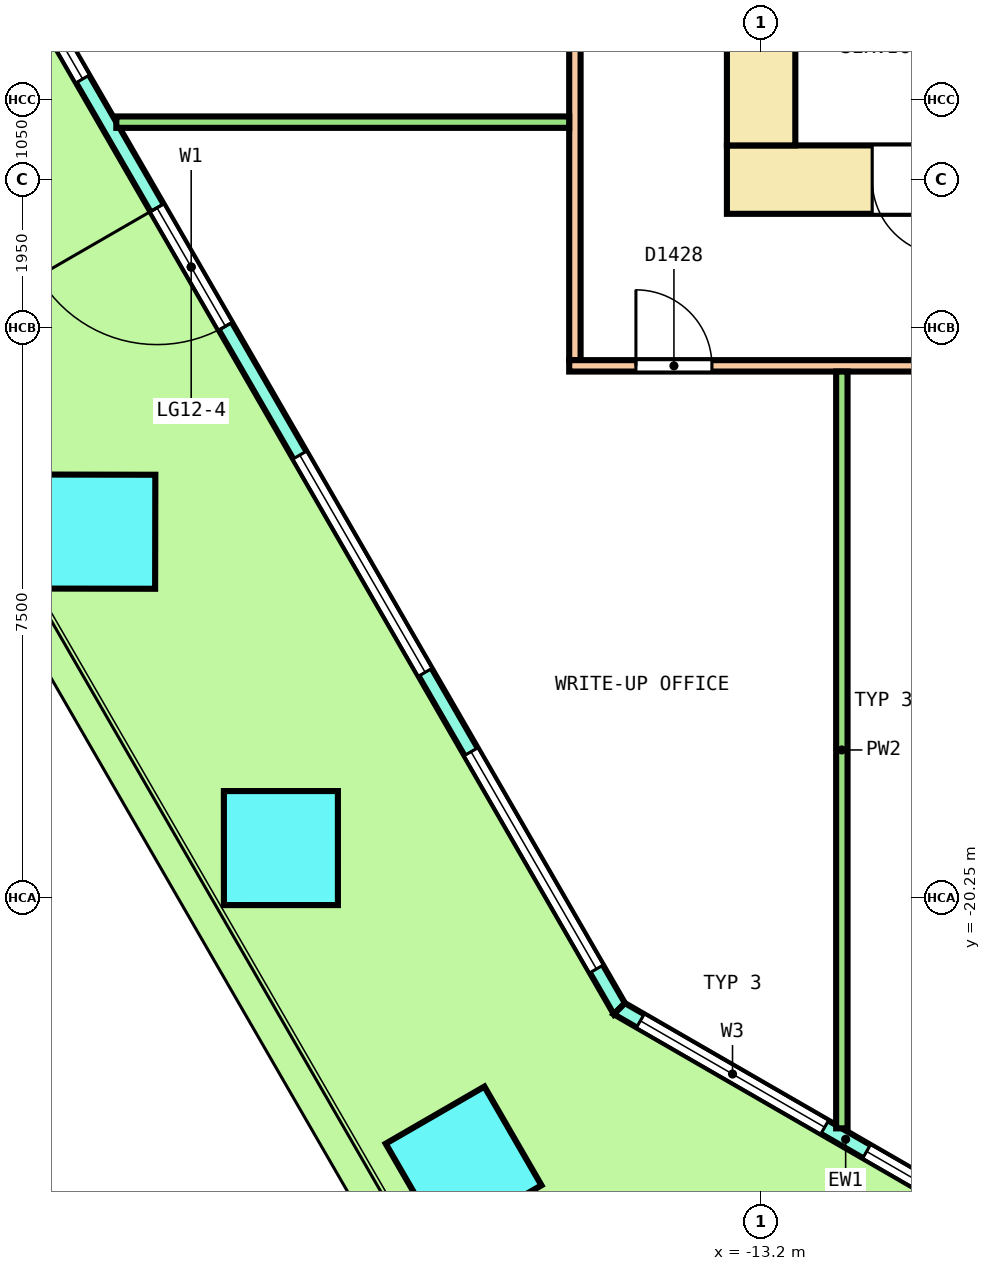
"""IFC4 building model, lengths in metres.
Left out: names, types, materials, properties, quantities, classifications, styles, units other than length and angle.
Written with IfcOpenShell. Run it as: python <this file> out.ifc"""

import sys

from ifc_helpers import new_model, si_unit, direction, frame, frame_2d, origin, origin_2d, place, context, subcontext, project, spatial, polyline, rectangle, outline, extrude, element, fill, save


model = new_model("IFC4")
c1 = context("Model", 3, precision=1e-05, world=origin(), true_north=direction((0.0, 1.0)))
c2 = subcontext(c1, "Body", "Model", "MODEL_VIEW")
j1 = project(units=[si_unit("LENGTHUNIT", "METRE"), si_unit("PLANEANGLEUNIT", "RADIAN")], contexts=[c1])
p1 = place(None, origin())
s1 = spatial("IfcSite", under=j1, at=p1, CompositionType="ELEMENT")
p2 = place(p1, origin())
s2 = spatial("IfcBuilding", under=s1, at=p2, CompositionType="ELEMENT")
p3 = place(p2, frame((0.0, 0.0, 54.2)))
s3 = spatial("IfcBuildingStorey", under=s2, at=p3, CompositionType="ELEMENT", Elevation=54.2)
p4 = place(p3, frame((-21.921, -15.431, 0.0), z_axis=(0.003616759812, -0.006269050341, 0.999973808685), x_axis=(0.498177152713, -0.867045063843, -0.007237525818)))
e1 = element("IfcColumn", 1, at=p4, inside=s3, PredefinedType="COLUMN", context=c2, shape_type="SweptSolid", body=[
    extrude(rectangle(XDim=1.5, YDim=1.5, at=origin_2d()), origin(), (0.0, 0.0, 1.0), 4.05),
])
p5 = place(p3, frame((-19.518, -19.594, 0.0), z_axis=(0.010908253887, -0.018863444567, 0.99976256204), x_axis=(0.500638377412, -0.865382225109, -0.021790354016)))
e2 = element("IfcColumn", 2, at=p5, inside=s3, PredefinedType="COLUMN", context=c2, shape_type="SweptSolid", body=[
    extrude(rectangle(XDim=1.5, YDim=1.5, at=origin_2d()), origin(), (0.0, 0.0, 1.0), 4.051),
])
p6 = place(p3, frame((-17.115, -23.757, 0.0), z_axis=(0.018132595726, -0.031445896907, 0.999340965106), x_axis=(0.865740985748, -0.499504693256, -0.031426215359)))
e3 = element("IfcColumn", 3, at=p6, inside=s3, PredefinedType="COLUMN", context=c2, shape_type="SweptSolid", body=[
    extrude(rectangle(XDim=1.5, YDim=1.5, at=origin_2d()), origin(), (0.0, 0.0, 1.0), 4.053),
])
p7 = place(p3, frame((-26.331, -2.193, 0.0), z_axis=(0.0, 0.0, 1.0), x_axis=(0.499998501835, -0.866026268748, 0.0)))
e4 = element("IfcWall", 4, at=p7, inside=s3, PredefinedType="SOLIDWALL", context=c2, shape_type="SweptSolid", body=[
    extrude(outline(polyline([(-0.027, -0.1), (1.0, -0.1), (2.027, -0.1), (3.053, -0.1), (4.08, -0.1), (5.106, -0.1), (6.133, -0.1), (7.16, -0.1), (8.187, -0.1), (9.213, -0.1), (10.24, -0.1), (11.267, -0.1), (12.293, -0.1), (13.32, -0.1), (14.347, -0.1), (15.373, -0.1), (16.4, -0.1), (17.427, -0.1), (18.453, -0.1), (19.48, -0.1), (20.507, -0.1), (21.533, -0.1), (22.56, -0.1), (22.506, 0.1), (21.485, 0.1), (20.463, 0.1), (19.441, 0.1), (18.419, 0.1), (17.397, 0.1), (16.375, 0.1), (15.354, 0.1), (14.332, 0.1), (13.31, 0.1), (12.288, 0.1), (11.267, 0.1), (10.245, 0.1), (9.223, 0.1), (8.201, 0.1), (7.179, 0.1), (6.158, 0.1), (5.136, 0.1), (4.114, 0.1), (3.092, 0.1), (2.071, 0.1), (1.049, 0.1), (0.027, 0.1), (-0.027, -0.1)])), origin(), (0.0, 0.0, 1.0), 4.1),
])
p8 = place(p7, frame((0.603, 0.0, 0.1)))
e5 = element("IfcOpeningElement", 5, at=p8, cuts=e4, PredefinedType="OPENING", context=c2, shape_type="SweptSolid", body=[
    extrude(rectangle(XDim=3.3, YDim=2.9, at=frame_2d((1.65, 1.45))), frame((0.0, 0.11, 0.0), z_axis=(0.0, -1.0, 0.0), x_axis=(1.0, 0.0, 0.0)), (0.0, 0.0, 1.0), 0.22),
])
p9 = place(p7, frame((5.11, 0.0, 0.1)))
e6 = element("IfcOpeningElement", 6, at=p9, cuts=e4, PredefinedType="OPENING", context=c2, shape_type="SweptSolid", body=[
    extrude(rectangle(XDim=3.3, YDim=2.9, at=frame_2d((1.65, 1.45))), frame((0.0, 0.11, 0.0), z_axis=(0.0, -1.0, 0.0), x_axis=(1.0, 0.0, 0.0)), (0.0, 0.0, 1.0), 0.22),
])
p10 = place(p7, frame((10.367, 0.0, 0.0)))
e7 = element("IfcOpeningElement", 7, at=p10, cuts=e4, PredefinedType="OPENING", context=c2, shape_type="SweptSolid", body=[
    extrude(rectangle(XDim=1.8, YDim=2.4, at=frame_2d((0.9, 1.2))), frame((0.0, 0.11, 0.0), z_axis=(0.0, -1.0, 0.0), x_axis=(1.0, 0.0, 0.0)), (0.0, 0.0, 1.0), 0.22),
])
p11 = place(p7, frame((10.367, 0.0, 2.55)))
e8 = element("IfcOpeningElement", 8, at=p11, cuts=e4, PredefinedType="OPENING", context=c2, shape_type="SweptSolid", body=[
    extrude(rectangle(XDim=1.8, YDim=0.45, at=frame_2d((0.9, 0.225))), frame((0.0, 0.11, 0.0), z_axis=(0.0, -1.0, 0.0), x_axis=(1.0, 0.0, 0.0)), (0.0, 0.0, 1.0), 0.22),
])
p12 = place(p7, frame((14.123, 0.0, 0.1)))
e9 = element("IfcOpeningElement", 9, at=p12, cuts=e4, PredefinedType="OPENING", context=c2, shape_type="SweptSolid", body=[
    extrude(rectangle(XDim=3.3, YDim=2.9, at=frame_2d((1.65, 1.45))), frame((0.0, 0.11, 0.0), z_axis=(0.0, -1.0, 0.0), x_axis=(1.0, 0.0, 0.0)), (0.0, 0.0, 1.0), 0.22),
])
p13 = place(p7, frame((18.63, 0.0, 0.1)))
e10 = element("IfcOpeningElement", 10, at=p13, cuts=e4, PredefinedType="OPENING", context=c2, shape_type="SweptSolid", body=[
    extrude(rectangle(XDim=3.3, YDim=2.9, at=frame_2d((1.65, 1.45))), frame((0.0, 0.11, 0.0), z_axis=(0.0, -1.0, 0.0), x_axis=(1.0, 0.0, 0.0)), (0.0, 0.0, 1.0), 0.22),
])
p14 = place(p3, frame((-15.065, -21.707, 0.0), z_axis=(0.0, 0.0, 1.0), x_axis=(0.866029458321, -0.49999297727, 0.0)))
e11 = element("IfcWall", 11, at=p14, inside=s3, PredefinedType="SOLIDWALL", context=c2, shape_type="SweptSolid", body=[
    extrude(outline(polyline([(-0.027, -0.1), (1.128, -0.1), (2.282, -0.1), (3.437, -0.1), (4.592, -0.1), (5.747, -0.1), (6.901, -0.1), (6.848, 0.1), (5.711, 0.1), (4.574, 0.1), (3.437, 0.1), (2.301, 0.1), (1.164, 0.1), (0.027, 0.1), (-0.027, -0.1)])), origin(), (0.0, 0.0, 1.0), 4.1),
])
p15 = place(p14, frame((0.319, 0.0, 0.1)))
e12 = element("IfcOpeningElement", 12, at=p15, cuts=e11, PredefinedType="OPENING", context=c2, shape_type="SweptSolid", body=[
    extrude(rectangle(XDim=2.8, YDim=2.9, at=frame_2d((1.4, 1.45))), frame((0.0, 0.11, 0.0), z_axis=(0.0, -1.0, 0.0), x_axis=(1.0, 0.0, 0.0)), (0.0, 0.0, 1.0), 0.22),
])
p16 = place(p14, frame((3.756, 0.0, 0.1)))
e13 = element("IfcOpeningElement", 13, at=p16, cuts=e11, PredefinedType="OPENING", context=c2, shape_type="SweptSolid", body=[
    extrude(rectangle(XDim=2.8, YDim=2.9, at=frame_2d((1.4, 1.45))), frame((0.0, 0.11, 0.0), z_axis=(0.0, -1.0, 0.0), x_axis=(1.0, 0.0, 0.0)), (0.0, 0.0, 1.0), 0.22),
])
p17 = place(p3, frame((-13.65, -10.8, 0.0), z_axis=(0.0, 0.0, 1.0), x_axis=(1.0, 0.0, 0.0)))
e14 = element("IfcWall", 14, at=p17, inside=s3, PredefinedType="SHEAR", context=c2, shape_type="SweptSolid", body=[
    extrude(rectangle(XDim=27.3, YDim=0.9, at=frame_2d((13.65, 0.0))), origin(), (0.0, 0.0, 1.0), 4.1),
])
p18 = place(p17, frame((1.911, 0.0, 0.0)))
e15 = element("IfcOpeningElement", 15, at=p18, cuts=e14, PredefinedType="OPENING", context=c2, shape_type="SweptSolid", body=[
    extrude(rectangle(XDim=1.0, YDim=2.1, at=frame_2d((0.5, 1.05))), frame((0.0, 0.46, 0.0), z_axis=(0.0, -1.0, 0.0), x_axis=(1.0, 0.0, 0.0)), (0.0, 0.0, 1.0), 0.92),
])
p19 = place(p17, frame((5.027, 0.0, 0.0)))
e16 = element("IfcOpeningElement", 16, at=p19, cuts=e14, PredefinedType="OPENING", context=c2, shape_type="SweptSolid", body=[
    extrude(rectangle(XDim=1.0, YDim=2.1, at=frame_2d((0.5, 1.05))), frame((0.0, 0.46, 0.0), z_axis=(0.0, -1.0, 0.0), x_axis=(1.0, 0.0, 0.0)), (0.0, 0.0, 1.0), 0.92),
])
p20 = place(p17, frame((8.111, 0.0, 0.0)))
e17 = element("IfcOpeningElement", 17, at=p20, cuts=e14, PredefinedType="OPENING", context=c2, shape_type="SweptSolid", body=[
    extrude(rectangle(XDim=1.0, YDim=2.1, at=frame_2d((0.5, 1.05))), frame((0.0, 0.46, 0.0), z_axis=(0.0, -1.0, 0.0), x_axis=(1.0, 0.0, 0.0)), (0.0, 0.0, 1.0), 0.92),
])
p21 = place(p17, frame((11.195, 0.0, 0.0)))
e18 = element("IfcOpeningElement", 18, at=p21, cuts=e14, PredefinedType="OPENING", context=c2, shape_type="SweptSolid", body=[
    extrude(rectangle(XDim=1.0, YDim=2.1, at=frame_2d((0.5, 1.05))), frame((0.0, 0.46, 0.0), z_axis=(0.0, -1.0, 0.0), x_axis=(1.0, 0.0, 0.0)), (0.0, 0.0, 1.0), 0.92),
])
p22 = place(p17, frame((19.202, 0.0, 0.0)))
e19 = element("IfcOpeningElement", 19, at=p22, cuts=e14, PredefinedType="OPENING", context=c2, shape_type="SweptSolid", body=[
    extrude(rectangle(XDim=1.0, YDim=2.1, at=frame_2d((0.5, 1.05))), frame((0.0, 0.46, 0.0), z_axis=(0.0, -1.0, 0.0), x_axis=(1.0, 0.0, 0.0)), (0.0, 0.0, 1.0), 0.92),
])
p23 = place(p17, frame((21.881, 0.0, 0.0)))
e20 = element("IfcOpeningElement", 20, at=p23, cuts=e14, PredefinedType="OPENING", context=c2, shape_type="SweptSolid", body=[
    extrude(rectangle(XDim=1.0, YDim=2.1, at=frame_2d((0.5, 1.05))), frame((0.0, 0.46, 0.0), z_axis=(0.0, -1.0, 0.0), x_axis=(1.0, 0.0, 0.0)), (0.0, 0.0, 1.0), 0.92),
])
p24 = place(p17, frame((24.592, 0.0, 0.0)))
e21 = element("IfcOpeningElement", 21, at=p24, cuts=e14, PredefinedType="OPENING", context=c2, shape_type="SweptSolid", body=[
    extrude(rectangle(XDim=1.0, YDim=2.1, at=frame_2d((0.5, 1.05))), frame((0.0, 0.46, 0.0), z_axis=(0.0, -1.0, 0.0), x_axis=(1.0, 0.0, 0.0)), (0.0, 0.0, 1.0), 0.92),
])
p25 = place(p17, frame((15.2, 0.0, 0.0)))
e22 = element("IfcOpeningElement", 22, at=p25, cuts=e14, PredefinedType="OPENING", context=c2, shape_type="SweptSolid", body=[
    extrude(rectangle(XDim=1.2, YDim=2.1, at=frame_2d((0.6, 1.05))), frame((0.0, 0.46, 0.0), z_axis=(0.0, -1.0, 0.0), x_axis=(1.0, 0.0, 0.0)), (0.0, 0.0, 1.0), 0.92),
])
p26 = place(p3, frame((-13.2, -10.35, 0.0), z_axis=(0.0, 0.0, 1.0), x_axis=(0.0, 1.0, 0.0)))
e23 = element("IfcWall", 23, at=p26, inside=s3, PredefinedType="SHEAR", context=c2, shape_type="SweptSolid", body=[
    extrude(rectangle(XDim=20.7, YDim=0.9, at=frame_2d((10.35, 0.0))), origin(), (0.0, 0.0, 1.0), 4.1),
])
p27 = place(p26, frame((9.15, 0.0, 0.0)))
e24 = element("IfcOpeningElement", 24, at=p27, cuts=e23, PredefinedType="OPENING", context=c2, shape_type="SweptSolid", body=[
    extrude(rectangle(XDim=2.4, YDim=2.1, at=frame_2d((1.2, 1.05))), frame((0.0, 0.46, 0.0), z_axis=(0.0, -1.0, 0.0), x_axis=(1.0, 0.0, 0.0)), (0.0, 0.0, 1.0), 0.92),
])
p28 = place(p26, frame((16.05, 0.0, 0.0)))
e25 = element("IfcOpeningElement", 25, at=p28, cuts=e23, PredefinedType="OPENING", context=c2, shape_type="SweptSolid", body=[
    extrude(rectangle(XDim=1.2, YDim=2.1, at=frame_2d((0.6, 1.05))), frame((0.0, 0.46, 0.0), z_axis=(0.0, -1.0, 0.0), x_axis=(1.0, 0.0, 0.0)), (0.0, 0.0, 1.0), 0.92),
])
p29 = place(p26, frame((3.45, 0.0, 0.0)))
e26 = element("IfcOpeningElement", 26, at=p29, cuts=e23, PredefinedType="OPENING", context=c2, shape_type="SweptSolid", body=[
    extrude(rectangle(XDim=1.2, YDim=2.1, at=frame_2d((0.6, 1.05))), frame((0.0, 0.46, 0.0), z_axis=(0.0, -1.0, 0.0), x_axis=(1.0, 0.0, 0.0)), (0.0, 0.0, 1.0), 0.92),
])
p30 = place(p3, frame((-15.65, -13.175, 0.0), z_axis=(0.0, 0.0, 1.0), x_axis=(0.0, 1.0, 0.0)))
e27 = element("IfcWall", 27, at=p30, inside=s3, PredefinedType="PARTITIONING", context=c2, shape_type="SweptSolid", body=[
    extrude(rectangle(XDim=26.35, YDim=0.15, at=frame_2d((13.175, 0.0))), origin(), (0.0, 0.0, 1.0), 3.05),
])
p31 = place(p30, frame((24.743, 0.0, 0.0)))
e28 = element("IfcOpeningElement", 28, at=p31, cuts=e27, PredefinedType="OPENING", context=c2, shape_type="SweptSolid", body=[
    extrude(rectangle(XDim=1.0, YDim=2.1, at=frame_2d((0.5, 1.05))), frame((0.0, 0.085, 0.0), z_axis=(0.0, -1.0, 0.0), x_axis=(1.0, 0.0, 0.0)), (0.0, 0.0, 1.0), 0.17),
])
p32 = place(p30, frame((21.244, 0.0, 0.0)))
e29 = element("IfcOpeningElement", 29, at=p32, cuts=e27, PredefinedType="OPENING", context=c2, shape_type="SweptSolid", body=[
    extrude(rectangle(XDim=1.0, YDim=2.1, at=frame_2d((0.5, 1.05))), frame((0.0, 0.085, 0.0), z_axis=(0.0, -1.0, 0.0), x_axis=(1.0, 0.0, 0.0)), (0.0, 0.0, 1.0), 0.17),
])
p33 = place(p30, frame((7.979, 0.0, 0.0)))
e30 = element("IfcOpeningElement", 30, at=p33, cuts=e27, PredefinedType="OPENING", context=c2, shape_type="SweptSolid", body=[
    extrude(rectangle(XDim=1.2, YDim=2.1, at=frame_2d((0.6, 1.05))), frame((0.0, 0.085, 0.0), z_axis=(0.0, -1.0, 0.0), x_axis=(1.0, 0.0, 0.0)), (0.0, 0.0, 1.0), 0.17),
])
p34 = place(p3, frame((-15.725, -13.25, 0.0), z_axis=(0.0, 0.0, 1.0), x_axis=(1.0, 0.0, 0.0)))
e31 = element("IfcWall", 31, at=p34, inside=s3, PredefinedType="PARTITIONING", context=c2, shape_type="SweptSolid", body=[
    extrude(rectangle(XDim=31.325, YDim=0.15, at=frame_2d((15.663, 0.0))), origin(), (0.0, 0.0, 1.0), 3.05),
])
p35 = place(p34, frame((0.878, 0.0, 0.0)))
e32 = element("IfcOpeningElement", 32, at=p35, cuts=e31, PredefinedType="OPENING", context=c2, shape_type="SweptSolid", body=[
    extrude(rectangle(XDim=1.0, YDim=2.1, at=frame_2d((0.5, 1.05))), frame((0.0, 0.085, 0.0), z_axis=(0.0, -1.0, 0.0), x_axis=(1.0, 0.0, 0.0)), (0.0, 0.0, 1.0), 0.17),
])
p36 = place(p34, frame((5.126, 0.0, 0.0)))
e33 = element("IfcOpeningElement", 33, at=p36, cuts=e31, PredefinedType="OPENING", context=c2, shape_type="SweptSolid", body=[
    extrude(rectangle(XDim=1.2, YDim=2.1, at=frame_2d((0.6, 1.05))), frame((0.0, 0.085, 0.0), z_axis=(0.0, -1.0, 0.0), x_axis=(1.0, 0.0, 0.0)), (0.0, 0.0, 1.0), 0.17),
])
p37 = place(p34, frame((14.109, 0.0, 0.0)))
e34 = element("IfcOpeningElement", 34, at=p37, cuts=e31, PredefinedType="OPENING", context=c2, shape_type="SweptSolid", body=[
    extrude(rectangle(XDim=1.2, YDim=2.1, at=frame_2d((0.6, 1.05))), frame((0.0, 0.085, 0.0), z_axis=(0.0, -1.0, 0.0), x_axis=(1.0, 0.0, 0.0)), (0.0, 0.0, 1.0), 0.17),
])
p38 = place(p34, frame((22.11, 0.0, 0.0)))
e35 = element("IfcOpeningElement", 35, at=p38, cuts=e31, PredefinedType="OPENING", context=c2, shape_type="SweptSolid", body=[
    extrude(rectangle(XDim=1.0, YDim=2.1, at=frame_2d((0.5, 1.05))), frame((0.0, 0.085, 0.0), z_axis=(0.0, -1.0, 0.0), x_axis=(1.0, 0.0, 0.0)), (0.0, 0.0, 1.0), 0.17),
])
p39 = place(p34, frame((28.438, 0.0, 0.0)))
e36 = element("IfcOpeningElement", 36, at=p39, cuts=e31, PredefinedType="OPENING", context=c2, shape_type="SweptSolid", body=[
    extrude(rectangle(XDim=1.0, YDim=2.1, at=frame_2d((0.5, 1.05))), frame((0.0, 0.085, 0.0), z_axis=(0.0, -1.0, 0.0), x_axis=(1.0, 0.0, 0.0)), (0.0, 0.0, 1.0), 0.17),
])
p40 = place(p3, frame((-21.683, -10.044, 0.0), z_axis=(0.0, 0.0, 1.0), x_axis=(1.0, 0.0, 0.0)))
e37 = element("IfcWall", 37, at=p40, inside=s3, PredefinedType="PARTITIONING", context=c2, shape_type="SweptSolid", body=[
    extrude(rectangle(XDim=5.958, YDim=0.15, at=frame_2d((2.979, 0.0))), origin(), (0.0, 0.0, 1.0), 3.05),
])
p41 = place(p3, frame((-12.138, -23.281, 0.0), z_axis=(0.0, 0.0, 1.0), x_axis=(0.0, 1.0, 0.0)))
e38 = element("IfcWall", 38, at=p41, inside=s3, PredefinedType="PARTITIONING", context=c2, shape_type="SweptSolid", body=[
    extrude(rectangle(XDim=9.957, YDim=0.15, at=frame_2d((4.978, 0.0))), origin(), (0.0, 0.0, 1.0), 3.05),
])
p42 = place(p9, origin())
e39 = element("IfcWindow", 39, at=p42, inside=s3, PartitioningType="SINGLE_PANEL", PredefinedType="WINDOW", context=c2, shape_type="SweptSolid", body=[
    extrude(rectangle(XDim=3.3, YDim=2.9, at=frame_2d((1.65, 1.45))), frame((0.0, 0.03, 0.0), z_axis=(0.0, -1.0, 0.0), x_axis=(1.0, 0.0, 0.0)), (0.0, 0.0, 1.0), 0.06),
])
fill(e6, e39)
p43 = place(p10, origin())
e40 = element("IfcDoor", 40, at=p43, inside=s3, OperationType="DOUBLE_DOOR_SINGLE_SWING", PredefinedType="DOOR", context=c2, shape_type="SweptSolid", body=[
    extrude(rectangle(XDim=1.8, YDim=2.4, at=frame_2d((0.9, 1.2))), frame((0.0, 0.025, 0.0), z_axis=(0.0, -1.0, 0.0), x_axis=(1.0, 0.0, 0.0)), (0.0, 0.0, 1.0), 0.05),
])
fill(e7, e40)
p44 = place(p11, origin())
e41 = element("IfcWindow", 41, at=p44, inside=s3, PartitioningType="SINGLE_PANEL", PredefinedType="WINDOW", context=c2, shape_type="SweptSolid", body=[
    extrude(rectangle(XDim=1.8, YDim=0.45, at=frame_2d((0.9, 0.225))), frame((0.0, 0.03, 0.0), z_axis=(0.0, -1.0, 0.0), x_axis=(1.0, 0.0, 0.0)), (0.0, 0.0, 1.0), 0.06),
])
fill(e8, e41)
p45 = place(p12, origin())
e42 = element("IfcWindow", 42, at=p45, inside=s3, PartitioningType="SINGLE_PANEL", PredefinedType="WINDOW", context=c2, shape_type="SweptSolid", body=[
    extrude(rectangle(XDim=3.3, YDim=2.9, at=frame_2d((1.65, 1.45))), frame((0.0, 0.03, 0.0), z_axis=(0.0, -1.0, 0.0), x_axis=(1.0, 0.0, 0.0)), (0.0, 0.0, 1.0), 0.06),
])
fill(e9, e42)
p46 = place(p13, origin())
e43 = element("IfcWindow", 43, at=p46, inside=s3, PartitioningType="SINGLE_PANEL", PredefinedType="WINDOW", context=c2, shape_type="SweptSolid", body=[
    extrude(rectangle(XDim=3.3, YDim=2.9, at=frame_2d((1.65, 1.45))), frame((0.0, 0.03, 0.0), z_axis=(0.0, -1.0, 0.0), x_axis=(1.0, 0.0, 0.0)), (0.0, 0.0, 1.0), 0.06),
])
fill(e10, e43)
p47 = place(p15, origin())
e44 = element("IfcWindow", 44, at=p47, inside=s3, PartitioningType="SINGLE_PANEL", PredefinedType="WINDOW", context=c2, shape_type="SweptSolid", body=[
    extrude(rectangle(XDim=2.8, YDim=2.9, at=frame_2d((1.4, 1.45))), frame((0.0, 0.03, 0.0), z_axis=(0.0, -1.0, 0.0), x_axis=(1.0, 0.0, 0.0)), (0.0, 0.0, 1.0), 0.06),
])
fill(e12, e44)
p48 = place(p16, origin())
e45 = element("IfcWindow", 45, at=p48, inside=s3, PartitioningType="SINGLE_PANEL", PredefinedType="WINDOW", context=c2, shape_type="SweptSolid", body=[
    extrude(rectangle(XDim=2.8, YDim=2.9, at=frame_2d((1.4, 1.45))), frame((0.0, 0.03, 0.0), z_axis=(0.0, -1.0, 0.0), x_axis=(1.0, 0.0, 0.0)), (0.0, 0.0, 1.0), 0.06),
])
fill(e13, e45)
p49 = place(p18, origin())
e46 = element("IfcDoor", 46, at=p49, inside=s3, OperationType="SINGLE_SWING_LEFT", PredefinedType="DOOR", context=c2, shape_type="SweptSolid", body=[
    extrude(rectangle(XDim=1.0, YDim=2.1, at=frame_2d((0.5, 1.05))), frame((0.0, 0.3, 0.0), z_axis=(0.0, -1.0, 0.0), x_axis=(1.0, 0.0, 0.0)), (0.0, 0.0, 1.0), 0.6),
])
fill(e15, e46)
p50 = place(p35, origin())
e47 = element("IfcDoor", 47, at=p50, inside=s3, OperationType="SINGLE_SWING_RIGHT", PredefinedType="DOOR", context=c2, shape_type="SweptSolid", body=[
    extrude(rectangle(XDim=1.0, YDim=2.1, at=frame_2d((0.5, 1.05))), frame((0.0, 0.025, 0.0), z_axis=(0.0, -1.0, 0.0), x_axis=(1.0, 0.0, 0.0)), (0.0, 0.0, 1.0), 0.05),
])
fill(e32, e47)
save(model, sys.argv[1])
